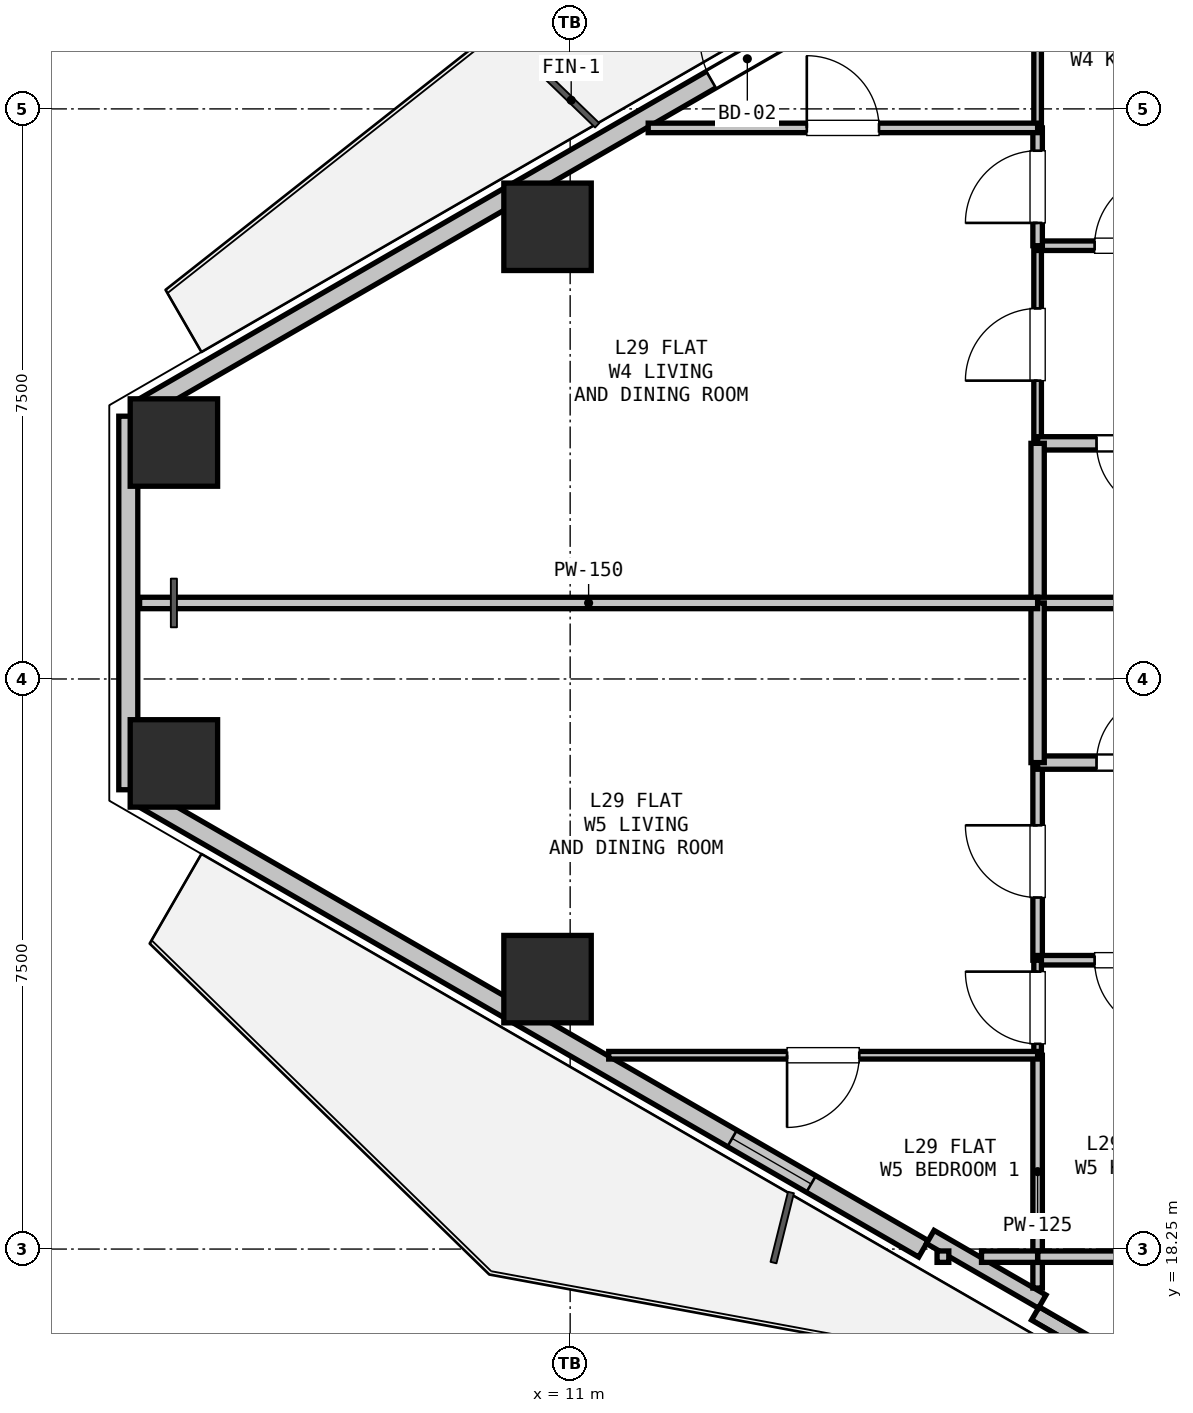
"""IFC4 building model, lengths in metres.
Left out: names, types, materials, properties, quantities, classifications, styles, units other than length and angle.
Written with IfcOpenShell. Run it as: python <this file> out.ifc"""

import sys

from ifc_helpers import new_model, si_unit, direction, frame, frame_2d, origin, origin_2d, place, context, subcontext, project, spatial, rectangle, hollow_rectangle, extrude, element, fill, save


model = new_model("IFC4")
c1 = context("Model", 3, precision=1e-05, world=origin(), true_north=direction((0.0, 1.0)))
c2 = subcontext(c1, "Body", "Model", "MODEL_VIEW")
j1 = project(units=[si_unit("LENGTHUNIT", "METRE"), si_unit("PLANEANGLEUNIT", "RADIAN")], contexts=[c1])
p1 = place(None, origin())
s1 = spatial("IfcSite", under=j1, at=p1, CompositionType="ELEMENT")
p2 = place(p1, origin())
s2 = spatial("IfcBuilding", under=s1, at=p2, CompositionType="ELEMENT")
p3 = place(p2, frame((0.0, 0.0, 106.5)))
s3 = spatial("IfcBuildingStorey", under=s2, at=p3, CompositionType="ELEMENT", Elevation=106.5)
for number, where, z_axis, x_axis in (
    (1, (5.787, 28.861, 0.0), (0.0, 0.0, 1.0), (1.0, 0.0, 0.0)),
    (2, (10.702, 31.699, 0.0), (0.0, 0.0, 1.0), (1.0, 0.0, 0.0)),
    (3, (10.702, 21.801, 0.0), (0.0, 0.0, 1.0), (1.0, 0.0, 0.0)),
    (4, (5.787, 24.639, 0.0), (0.0, 0.0, 1.0), (1.0, 0.0, 0.0)),
):
    element("IfcColumn", number, at=place(p3, frame(where, z_axis=z_axis, x_axis=x_axis)), inside=s3, PredefinedType="COLUMN", context=c2, shape_type="SweptSolid", body=[
        extrude(hollow_rectangle(XDim=1.15, YDim=1.15, WallThickness=0.032, at=origin_2d()), origin(), (0.0, 0.0, 1.0), 3.3),
    ])
p4 = place(p3, frame((5.187, 24.293, 0.0), z_axis=(0.0, 0.0, 1.0), x_axis=(0.0, 1.0, 0.0)))
e5 = element("IfcWall", 5, at=p4, inside=s3, PredefinedType="SOLIDWALL", context=c2, shape_type="SweptSolid", body=[
    extrude(rectangle(XDim=4.915, YDim=0.25, at=frame_2d((2.457, 0.0))), origin(), (0.0, 0.0, 1.0), 2.67),
])
p5 = place(p3, frame((5.317, 29.282, 0.0), z_axis=(0.0, 0.0, 1.0), x_axis=(0.866023023012, 0.500004123596, 0.0)))
e6 = element("IfcWall", 6, at=p5, inside=s3, PredefinedType="SOLIDWALL", context=c2, shape_type="SweptSolid", body=[
    extrude(rectangle(XDim=11.93, YDim=0.25, at=frame_2d((5.965, 0.0))), origin(), (0.0, 0.0, 1.0), 2.67),
])
p6 = place(p5, frame((8.704, 0.0, 0.0)))
e7 = element("IfcOpeningElement", 7, at=p6, cuts=e6, PredefinedType="OPENING", context=c2, shape_type="SweptSolid", body=[
    extrude(rectangle(XDim=1.1, YDim=2.1, at=frame_2d((0.55, 1.05))), frame((0.0, 0.135, 0.0), z_axis=(0.0, -1.0, 0.0), x_axis=(1.0, 0.0, 0.0)), (0.0, 0.0, 1.0), 0.27),
])
p7 = place(p3, frame((26.845, 11.788, 0.0), z_axis=(0.0, 0.0, 1.0), x_axis=(-0.866027010039, 0.499997217876, 0.0)))
e8 = element("IfcWall", 8, at=p7, inside=s3, PredefinedType="PARAPET", context=c2, shape_type="SweptSolid", body=[
    extrude(rectangle(XDim=11.229, YDim=0.2, at=frame_2d((5.615, 0.0))), origin(), (0.0, 0.0, 1.0), 0.2),
])
p8 = place(p3, frame((15.648, 18.253, 0.0), z_axis=(0.0, 0.0, 1.0), x_axis=(-0.866023023012, 0.500004123596, 0.0)))
e9 = element("IfcWall", 9, at=p8, inside=s3, PredefinedType="SOLIDWALL", context=c2, shape_type="SweptSolid", body=[
    extrude(rectangle(XDim=11.93, YDim=0.25, at=frame_2d((5.965, 0.0))), origin(), (0.0, 0.0, 1.0), 2.67),
])
p9 = place(p8, frame((1.706, 0.0, 0.9)))
e10 = element("IfcOpeningElement", 10, at=p9, cuts=e9, PredefinedType="OPENING", context=c2, shape_type="SweptSolid", body=[
    extrude(rectangle(XDim=1.2, YDim=1.4, at=frame_2d((0.6, 0.7))), frame((0.0, 0.135, 0.0), z_axis=(0.0, -1.0, 0.0), x_axis=(1.0, 0.0, 0.0)), (0.0, 0.0, 1.0), 0.27),
])
p10 = place(p3, frame((17.21, 17.559, 0.0), z_axis=(0.0, 0.0, 1.0), x_axis=(-0.866025371046, 0.500000056704, 0.0)))
e11 = element("IfcWall", 11, at=p10, inside=s3, PredefinedType="PARAPET", context=c2, shape_type="SweptSolid", body=[
    extrude(rectangle(XDim=1.7, YDim=0.2, at=frame_2d((0.85, 0.0))), origin(), (0.0, 0.0, 1.0), 2.67),
])
p11 = place(p3, frame((17.15, 28.85, 0.0), z_axis=(0.0, 0.0, 1.0), x_axis=(0.0, 1.0, 0.0)))
e12 = element("IfcWall", 12, at=p11, inside=s3, PredefinedType="PARTITIONING", context=c2, shape_type="SweptSolid", body=[
    extrude(rectangle(XDim=2.6, YDim=0.1, at=frame_2d((1.3, 0.0))), origin(), (0.0, 0.0, 1.0), 3.05),
])
p12 = place(p11, frame((0.825, 0.0, 0.0)))
e13 = element("IfcOpeningElement", 13, at=p12, cuts=e12, PredefinedType="OPENING", context=c2, shape_type="SweptSolid", body=[
    extrude(rectangle(XDim=0.95, YDim=2.1, at=frame_2d((0.475, 1.05))), frame((0.0, 0.06, 0.0), z_axis=(0.0, -1.0, 0.0), x_axis=(1.0, 0.0, 0.0)), (0.0, 0.0, 1.0), 0.12),
])
p13 = place(p3, frame((17.15, 31.45, 0.0), z_axis=(0.0, 0.0, 1.0), x_axis=(1.0, 0.0, 0.0)))
e14 = element("IfcWall", 14, at=p13, inside=s3, PredefinedType="PARTITIONING", context=c2, shape_type="SweptSolid", body=[
    extrude(rectangle(XDim=2.45, YDim=0.125, at=frame_2d((1.225, 0.0))), origin(), (0.0, 0.0, 1.0), 3.05),
])
p14 = place(p13, frame((0.75, 0.0, 0.0)))
e15 = element("IfcOpeningElement", 15, at=p14, cuts=e14, PredefinedType="OPENING", context=c2, shape_type="SweptSolid", body=[
    extrude(rectangle(XDim=0.95, YDim=2.1, at=frame_2d((0.475, 1.05))), frame((0.0, 0.073, 0.0), z_axis=(0.0, -1.0, 0.0), x_axis=(1.0, 0.0, 0.0)), (0.0, 0.0, 1.0), 0.145),
])
p15 = place(p3, frame((19.6, 28.85, 0.0), z_axis=(0.0, 0.0, 1.0), x_axis=(-1.0, 0.0, 0.0)))
e16 = element("IfcWall", 16, at=p15, inside=s3, PredefinedType="PLUMBINGWALL", context=c2, shape_type="SweptSolid", body=[
    extrude(rectangle(XDim=2.45, YDim=0.175, at=frame_2d((1.225, 0.0))), origin(), (0.0, 0.0, 1.0), 3.05),
])
p16 = place(p15, frame((0.775, 0.0, 0.0)))
e17 = element("IfcOpeningElement", 17, at=p16, cuts=e16, PredefinedType="OPENING", context=c2, shape_type="SweptSolid", body=[
    extrude(rectangle(XDim=0.9, YDim=2.1, at=frame_2d((0.45, 1.05))), frame((0.0, 0.097, 0.0), z_axis=(0.0, -1.0, 0.0), x_axis=(1.0, 0.0, 0.0)), (0.0, 0.0, 1.0), 0.195),
])
p17 = place(p3, frame((17.15, 22.05, 0.0), z_axis=(0.0, 0.0, 1.0), x_axis=(0.0, 1.0, 0.0)))
e18 = element("IfcWall", 18, at=p17, inside=s3, PredefinedType="PARTITIONING", context=c2, shape_type="SweptSolid", body=[
    extrude(rectangle(XDim=2.6, YDim=0.125, at=frame_2d((1.3, 0.0))), origin(), (0.0, 0.0, 1.0), 3.05),
])
p18 = place(p17, frame((0.825, 0.0, 0.0)))
e19 = element("IfcOpeningElement", 19, at=p18, cuts=e18, PredefinedType="OPENING", context=c2, shape_type="SweptSolid", body=[
    extrude(rectangle(XDim=0.95, YDim=2.1, at=frame_2d((0.475, 1.05))), frame((0.0, 0.073, 0.0), z_axis=(0.0, -1.0, 0.0), x_axis=(1.0, 0.0, 0.0)), (0.0, 0.0, 1.0), 0.145),
])
p19 = place(p3, frame((17.15, 24.65, 0.0), z_axis=(0.0, 0.0, 1.0), x_axis=(1.0, 0.0, 0.0)))
e20 = element("IfcWall", 20, at=p19, inside=s3, PredefinedType="PLUMBINGWALL", context=c2, shape_type="SweptSolid", body=[
    extrude(rectangle(XDim=2.45, YDim=0.175, at=frame_2d((1.225, 0.0))), origin(), (0.0, 0.0, 1.0), 3.05),
])
p20 = place(p19, frame((0.775, 0.0, 0.0)))
e21 = element("IfcOpeningElement", 21, at=p20, cuts=e20, PredefinedType="OPENING", context=c2, shape_type="SweptSolid", body=[
    extrude(rectangle(XDim=0.9, YDim=2.1, at=frame_2d((0.45, 1.05))), frame((0.0, 0.097, 0.0), z_axis=(0.0, -1.0, 0.0), x_axis=(1.0, 0.0, 0.0)), (0.0, 0.0, 1.0), 0.195),
])
p21 = place(p3, frame((19.6, 22.05, 0.0), z_axis=(0.0, 0.0, 1.0), x_axis=(-1.0, 0.0, 0.0)))
e22 = element("IfcWall", 22, at=p21, inside=s3, PredefinedType="PARTITIONING", context=c2, shape_type="SweptSolid", body=[
    extrude(rectangle(XDim=2.45, YDim=0.125, at=frame_2d((1.225, 0.0))), origin(), (0.0, 0.0, 1.0), 3.05),
])
p22 = place(p21, frame((0.75, 0.0, 0.0)))
e23 = element("IfcOpeningElement", 23, at=p22, cuts=e22, PredefinedType="OPENING", context=c2, shape_type="SweptSolid", body=[
    extrude(rectangle(XDim=0.95, YDim=2.1, at=frame_2d((0.475, 1.05))), frame((0.0, 0.073, 0.0), z_axis=(0.0, -1.0, 0.0), x_axis=(1.0, 0.0, 0.0)), (0.0, 0.0, 1.0), 0.145),
])
p23 = place(p3, frame((17.15, 26.75, 0.0), z_axis=(0.0, 0.0, 1.0), x_axis=(0.0, 1.0, 0.0)))
e24 = element("IfcWall", 24, at=p23, inside=s3, PredefinedType="PLUMBINGWALL", context=c2, shape_type="SweptSolid", body=[
    extrude(rectangle(XDim=2.1, YDim=0.175, at=frame_2d((1.05, 0.0))), origin(), (0.0, 0.0, 1.0), 3.05),
])
p24 = place(p3, frame((19.6, 26.75, 0.0), z_axis=(0.0, 0.0, 1.0), x_axis=(-1.0, 0.0, 0.0)))
e25 = element("IfcWall", 25, at=p24, inside=s3, PredefinedType="PARTITIONING", context=c2, shape_type="SweptSolid", body=[
    extrude(rectangle(XDim=2.45, YDim=0.15, at=frame_2d((1.225, 0.0))), origin(), (0.0, 0.0, 1.0), 3.05),
])
p25 = place(p3, frame((17.15, 31.45, 0.0), z_axis=(0.0, 0.0, 1.0), x_axis=(0.0, 1.0, 0.0)))
e26 = element("IfcWall", 26, at=p25, inside=s3, PredefinedType="PARTITIONING", context=c2, shape_type="SweptSolid", body=[
    extrude(rectangle(XDim=1.55, YDim=0.125, at=frame_2d((0.775, 0.0))), origin(), (0.0, 0.0, 1.0), 2.423),
])
p26 = place(p25, frame((0.3, 0.0, 0.0)))
e27 = element("IfcOpeningElement", 27, at=p26, cuts=e26, PredefinedType="OPENING", context=c2, shape_type="SweptSolid", body=[
    extrude(rectangle(XDim=0.95, YDim=2.1, at=frame_2d((0.475, 1.05))), frame((0.0, 0.073, 0.0), z_axis=(0.0, -1.0, 0.0), x_axis=(1.0, 0.0, 0.0)), (0.0, 0.0, 1.0), 0.145),
])
p27 = place(p3, frame((17.15, 33.0, 0.0), z_axis=(0.0, 0.0, 1.0), x_axis=(0.0, 1.0, 0.0)))
e28 = element("IfcWall", 28, at=p27, inside=s3, PredefinedType="PARTITIONING", context=c2, shape_type="SweptSolid", body=[
    extrude(rectangle(XDim=2.35, YDim=0.1, at=frame_2d((1.175, 0.0))), origin(), (0.0, 0.0, 1.0), 2.365),
])
p28 = place(p3, frame((17.15, 24.65, 0.0), z_axis=(0.0, 0.0, 1.0), x_axis=(0.0, 1.0, 0.0)))
e29 = element("IfcWall", 29, at=p28, inside=s3, PredefinedType="PLUMBINGWALL", context=c2, shape_type="SweptSolid", body=[
    extrude(rectangle(XDim=2.1, YDim=0.175, at=frame_2d((1.05, 0.0))), origin(), (0.0, 0.0, 1.0), 3.05),
])
p29 = place(p3, frame((17.15, 17.737, 0.0), z_axis=(0.0, 0.0, 1.0), x_axis=(0.0, 1.0, 0.0)))
e30 = element("IfcWall", 30, at=p29, inside=s3, PredefinedType="PARTITIONING", context=c2, shape_type="SweptSolid", body=[
    extrude(rectangle(XDim=3.063, YDim=0.125, at=frame_2d((1.532, 0.0))), origin(), (0.0, 0.0, 1.0), 2.365),
])
p30 = place(p3, frame((17.15, 20.8, 0.0), z_axis=(0.0, 0.0, 1.0), x_axis=(0.0, 1.0, 0.0)))
e31 = element("IfcWall", 31, at=p30, inside=s3, PredefinedType="PARTITIONING", context=c2, shape_type="SweptSolid", body=[
    extrude(rectangle(XDim=1.25, YDim=0.1, at=frame_2d((0.625, 0.0))), origin(), (0.0, 0.0, 1.0), 2.423),
])
p31 = place(p30, frame((0.15, 0.0, 0.0)))
e32 = element("IfcOpeningElement", 32, at=p31, cuts=e31, PredefinedType="OPENING", context=c2, shape_type="SweptSolid", body=[
    extrude(rectangle(XDim=0.95, YDim=2.1, at=frame_2d((0.475, 1.05))), frame((0.0, 0.06, 0.0), z_axis=(0.0, -1.0, 0.0), x_axis=(1.0, 0.0, 0.0)), (0.0, 0.0, 1.0), 0.12),
])
p32 = place(p3, frame((19.6, 18.15, 0.0), z_axis=(0.0, 0.0, 1.0), x_axis=(-1.0, 0.0, 0.0)))
e33 = element("IfcWall", 33, at=p32, inside=s3, PredefinedType="PARTITIONING", context=c2, shape_type="SweptSolid", body=[
    extrude(rectangle(XDim=2.45, YDim=0.15, at=frame_2d((1.225, 0.0))), origin(), (0.0, 0.0, 1.0), 2.365),
])
p33 = place(p3, frame((15.827, 18.15, 0.0), z_axis=(0.0, 0.0, 1.0), x_axis=(1.0, 0.0, 0.0)))
e34 = element("IfcWall", 34, at=p33, inside=s3, PredefinedType="PARTITIONING", context=c2, shape_type="SweptSolid", body=[
    extrude(rectangle(XDim=0.155, YDim=0.15, at=frame_2d((0.077, 0.0))), origin(), (0.0, 0.0, 1.0), 3.05),
])
p34 = place(p3, frame((16.412, 18.15, 0.0), z_axis=(0.0, 0.0, 1.0), x_axis=(1.0, 0.0, 0.0)))
e35 = element("IfcWall", 35, at=p34, inside=s3, PredefinedType="PARTITIONING", context=c2, shape_type="SweptSolid", body=[
    extrude(rectangle(XDim=0.738, YDim=0.15, at=frame_2d((0.369, 0.0))), origin(), (0.0, 0.0, 1.0), 2.365),
])
p35 = place(p3, frame((12.027, 33.0, 0.0), z_axis=(0.0, 0.0, 1.0), x_axis=(1.0, 0.0, 0.0)))
e36 = element("IfcWall", 36, at=p35, inside=s3, PredefinedType="PARTITIONING", context=c2, shape_type="SweptSolid", body=[
    extrude(rectangle(XDim=5.123, YDim=0.125, at=frame_2d((2.562, 0.0))), origin(), (0.0, 0.0, 1.0), 2.365),
])
p36 = place(p35, frame((2.086, 0.0, 0.0)))
e37 = element("IfcOpeningElement", 37, at=p36, cuts=e36, PredefinedType="OPENING", context=c2, shape_type="SweptSolid", body=[
    extrude(rectangle(XDim=0.95, YDim=2.1, at=frame_2d((0.475, 1.05))), frame((0.0, 0.073, 0.0), z_axis=(0.0, -1.0, 0.0), x_axis=(1.0, 0.0, 0.0)), (0.0, 0.0, 1.0), 0.145),
])
p37 = place(p3, frame((17.15, 26.75, 0.0), z_axis=(0.0, 0.0, 1.0), x_axis=(-1.0, 0.0, 0.0)))
e38 = element("IfcWall", 38, at=p37, inside=s3, PredefinedType="PARTITIONING", context=c2, shape_type="SweptSolid", body=[
    extrude(rectangle(XDim=11.814, YDim=0.15, at=frame_2d((5.907, 0.0))), origin(), (0.0, 0.0, 1.0), 2.715),
])
p38 = place(p3, frame((17.15, 20.8, 0.0), z_axis=(0.0, 0.0, 1.0), x_axis=(-1.0, 0.0, 0.0)))
e39 = element("IfcWall", 39, at=p38, inside=s3, PredefinedType="PARTITIONING", context=c2, shape_type="SweptSolid", body=[
    extrude(rectangle(XDim=5.643, YDim=0.1, at=frame_2d((2.821, 0.0))), origin(), (0.0, 0.0, 1.0), 2.365),
])
p39 = place(p38, frame((2.346, 0.0, 0.0)))
e40 = element("IfcOpeningElement", 40, at=p39, cuts=e39, PredefinedType="OPENING", context=c2, shape_type="SweptSolid", body=[
    extrude(rectangle(XDim=0.95, YDim=2.1, at=frame_2d((0.475, 1.05))), frame((0.0, 0.06, 0.0), z_axis=(0.0, -1.0, 0.0), x_axis=(1.0, 0.0, 0.0)), (0.0, 0.0, 1.0), 0.12),
])
p40 = place(p6, origin())
e41 = element("IfcDoor", 41, at=p40, inside=s3, OperationType="SINGLE_SWING_RIGHT", PredefinedType="DOOR", context=c2, shape_type="SweptSolid", body=[
    extrude(rectangle(XDim=1.1, YDim=2.1, at=frame_2d((0.55, 1.05))), frame((0.0, 0.025, 0.0), z_axis=(0.0, -1.0, 0.0), x_axis=(1.0, 0.0, 0.0)), (0.0, 0.0, 1.0), 0.05),
])
fill(e7, e41)
p41 = place(p9, origin())
e42 = element("IfcWindow", 42, at=p41, inside=s3, PartitioningType="SINGLE_PANEL", PredefinedType="WINDOW", context=c2, shape_type="SweptSolid", body=[
    extrude(rectangle(XDim=1.2, YDim=1.4, at=frame_2d((0.6, 0.7))), frame((0.0, 0.03, 0.0), z_axis=(0.0, -1.0, 0.0), x_axis=(1.0, 0.0, 0.0)), (0.0, 0.0, 1.0), 0.06),
])
fill(e10, e42)
p42 = place(p16, origin())
e43 = element("IfcDoor", 43, at=p42, inside=s3, OperationType="SINGLE_SWING_LEFT", PredefinedType="DOOR", context=c2, shape_type="SweptSolid", body=[
    extrude(rectangle(XDim=0.9, YDim=2.1, at=frame_2d((0.45, 1.05))), frame((0.0, 0.025, 0.0), z_axis=(0.0, -1.0, 0.0), x_axis=(1.0, 0.0, 0.0)), (0.0, 0.0, 1.0), 0.05),
])
fill(e17, e43)
p43 = place(p14, origin())
e44 = element("IfcDoor", 44, at=p43, inside=s3, OperationType="SINGLE_SWING_RIGHT", PredefinedType="DOOR", context=c2, shape_type="SweptSolid", body=[
    extrude(rectangle(XDim=0.95, YDim=2.1, at=frame_2d((0.475, 1.05))), frame((0.0, 0.025, 0.0), z_axis=(0.0, -1.0, 0.0), x_axis=(1.0, 0.0, 0.0)), (0.0, 0.0, 1.0), 0.05),
])
fill(e15, e44)
p44 = place(p12, origin())
e45 = element("IfcDoor", 45, at=p44, inside=s3, OperationType="SINGLE_SWING_LEFT", PredefinedType="DOOR", context=c2, shape_type="SweptSolid", body=[
    extrude(rectangle(XDim=0.95, YDim=2.1, at=frame_2d((0.475, 1.05))), frame((0.0, 0.025, 0.0), z_axis=(0.0, -1.0, 0.0), x_axis=(1.0, 0.0, 0.0)), (0.0, 0.0, 1.0), 0.05),
])
fill(e13, e45)
p45 = place(p20, origin())
e46 = element("IfcDoor", 46, at=p45, inside=s3, OperationType="SINGLE_SWING_RIGHT", PredefinedType="DOOR", context=c2, shape_type="SweptSolid", body=[
    extrude(rectangle(XDim=0.9, YDim=2.1, at=frame_2d((0.45, 1.05))), frame((0.0, 0.025, 0.0), z_axis=(0.0, -1.0, 0.0), x_axis=(1.0, 0.0, 0.0)), (0.0, 0.0, 1.0), 0.05),
])
fill(e21, e46)
p46 = place(p22, origin())
e47 = element("IfcDoor", 47, at=p46, inside=s3, OperationType="SINGLE_SWING_LEFT", PredefinedType="DOOR", context=c2, shape_type="SweptSolid", body=[
    extrude(rectangle(XDim=0.95, YDim=2.1, at=frame_2d((0.475, 1.05))), frame((0.0, 0.025, 0.0), z_axis=(0.0, -1.0, 0.0), x_axis=(1.0, 0.0, 0.0)), (0.0, 0.0, 1.0), 0.05),
])
fill(e23, e47)
p47 = place(p18, origin())
e48 = element("IfcDoor", 48, at=p47, inside=s3, OperationType="SINGLE_SWING_RIGHT", PredefinedType="DOOR", context=c2, shape_type="SweptSolid", body=[
    extrude(rectangle(XDim=0.95, YDim=2.1, at=frame_2d((0.475, 1.05))), frame((0.0, 0.025, 0.0), z_axis=(0.0, -1.0, 0.0), x_axis=(1.0, 0.0, 0.0)), (0.0, 0.0, 1.0), 0.05),
])
fill(e19, e48)
p48 = place(p26, origin())
e49 = element("IfcDoor", 49, at=p48, inside=s3, OperationType="SINGLE_SWING_LEFT", PredefinedType="DOOR", context=c2, shape_type="SweptSolid", body=[
    extrude(rectangle(XDim=0.95, YDim=2.1, at=frame_2d((0.475, 1.05))), frame((0.0, 0.025, 0.0), z_axis=(0.0, -1.0, 0.0), x_axis=(1.0, 0.0, 0.0)), (0.0, 0.0, 1.0), 0.05),
])
fill(e27, e49)
p49 = place(p31, origin())
e50 = element("IfcDoor", 50, at=p49, inside=s3, OperationType="SINGLE_SWING_RIGHT", PredefinedType="DOOR", context=c2, shape_type="SweptSolid", body=[
    extrude(rectangle(XDim=0.95, YDim=2.1, at=frame_2d((0.475, 1.05))), frame((0.0, 0.025, 0.0), z_axis=(0.0, -1.0, 0.0), x_axis=(1.0, 0.0, 0.0)), (0.0, 0.0, 1.0), 0.05),
])
fill(e32, e50)
p50 = place(p36, origin())
e51 = element("IfcDoor", 51, at=p50, inside=s3, OperationType="SINGLE_SWING_LEFT", PredefinedType="DOOR", context=c2, shape_type="SweptSolid", body=[
    extrude(rectangle(XDim=0.95, YDim=2.1, at=frame_2d((0.475, 1.05))), frame((0.0, 0.025, 0.0), z_axis=(0.0, -1.0, 0.0), x_axis=(1.0, 0.0, 0.0)), (0.0, 0.0, 1.0), 0.05),
])
fill(e37, e51)
p51 = place(p39, origin())
e52 = element("IfcDoor", 52, at=p51, inside=s3, OperationType="SINGLE_SWING_RIGHT", PredefinedType="DOOR", context=c2, shape_type="SweptSolid", body=[
    extrude(rectangle(XDim=0.95, YDim=2.1, at=frame_2d((0.475, 1.05))), frame((0.0, 0.025, 0.0), z_axis=(0.0, -1.0, 0.0), x_axis=(1.0, 0.0, 0.0)), (0.0, 0.0, 1.0), 0.05),
])
fill(e40, e52)
save(model, sys.argv[1])
